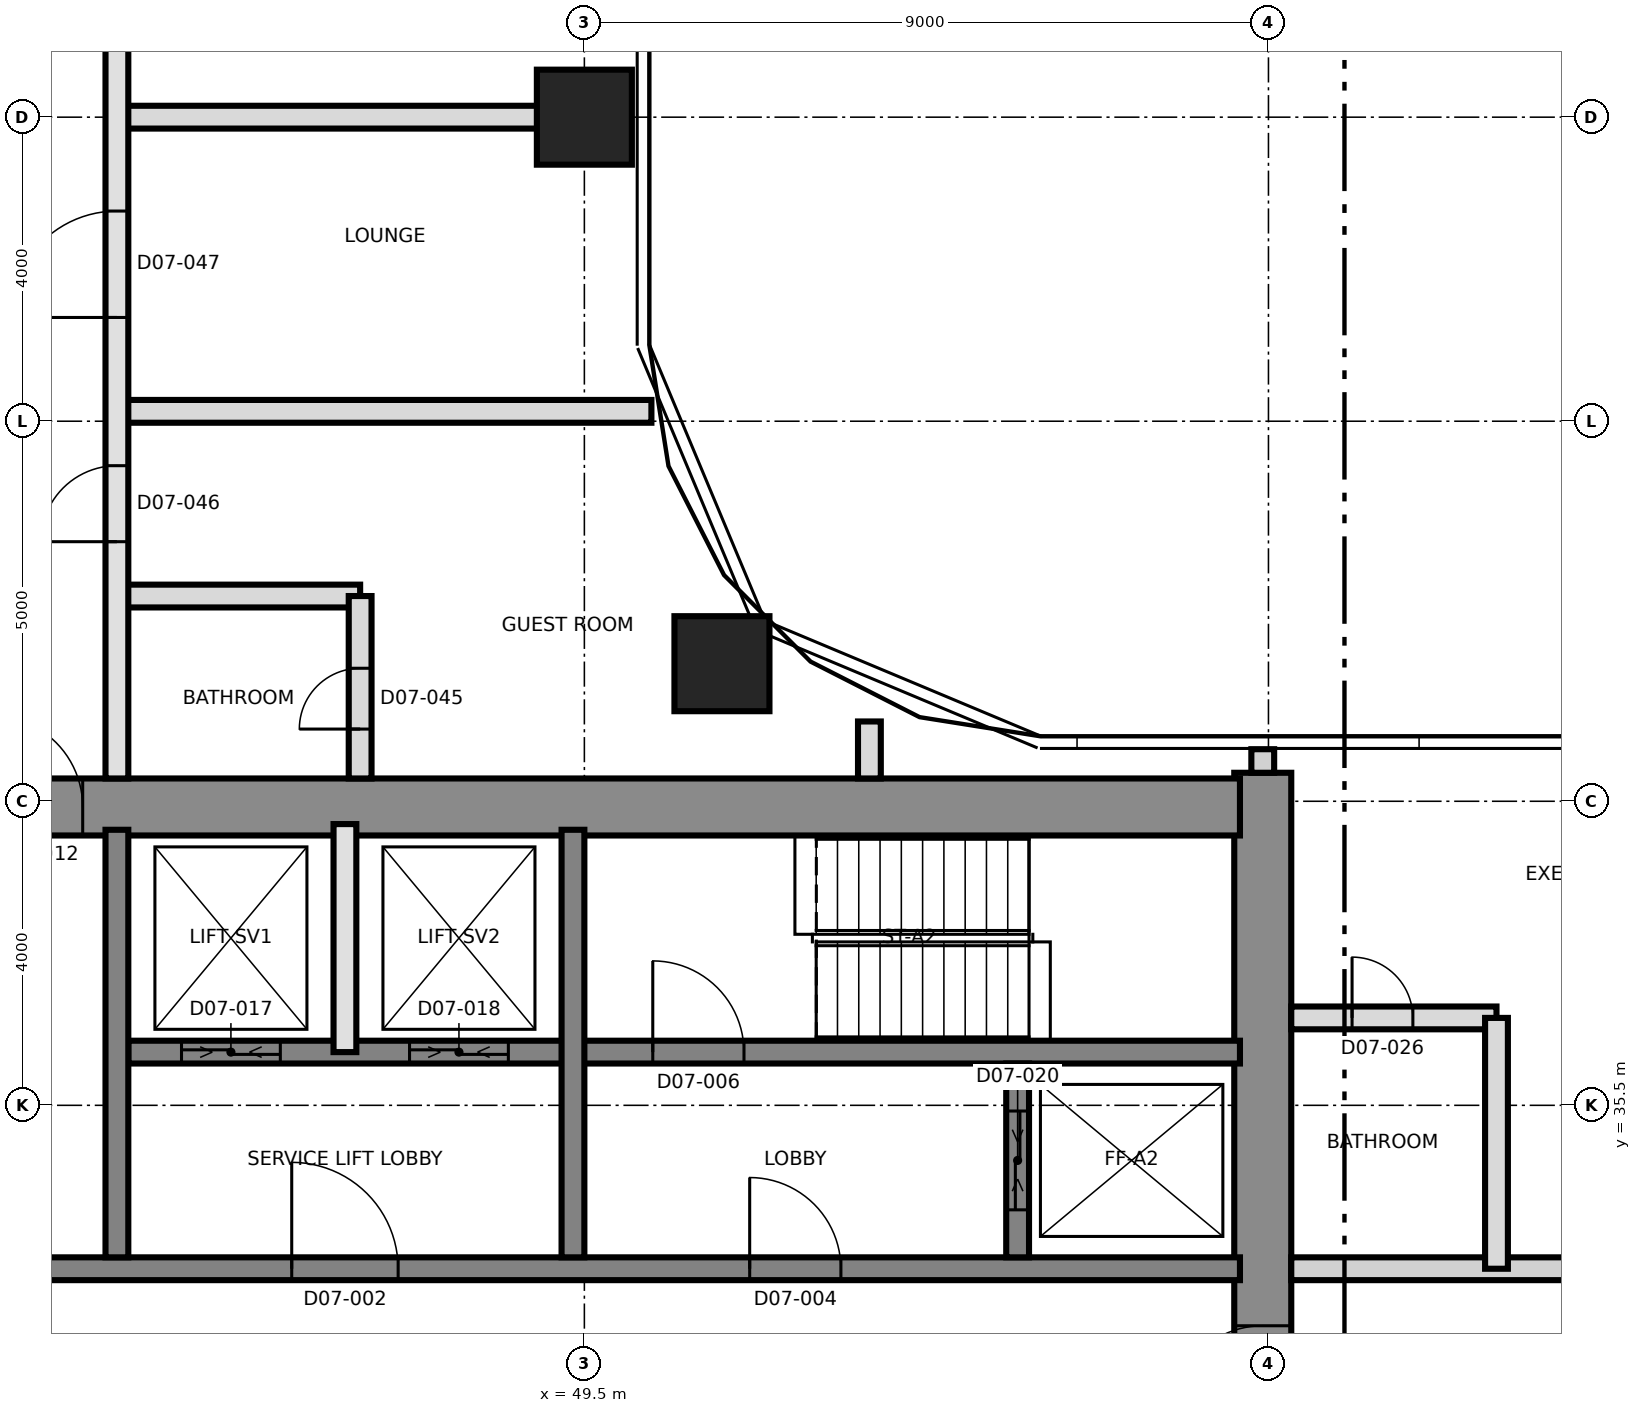
"""IFC4 building model, lengths in metres.
Left out: names, types, materials, properties, quantities, classifications, styles, units other than length and angle.
Written with IfcOpenShell. Run it as: python <this file> out.ifc"""

import sys

from ifc_helpers import new_model, si_unit, direction, frame, frame_2d, origin, origin_2d, place, context, subcontext, project, spatial, rectangle, extrude, element, fill, save


model = new_model("IFC4")
c1 = context("Model", 3, precision=1e-05, world=origin(), true_north=direction((0.0, 1.0)))
c2 = subcontext(c1, "Body", "Model", "MODEL_VIEW")
j1 = project(units=[si_unit("LENGTHUNIT", "METRE"), si_unit("PLANEANGLEUNIT", "RADIAN")], contexts=[c1])
p1 = place(None, origin())
s1 = spatial("IfcSite", under=j1, at=p1, CompositionType="ELEMENT")
p2 = place(p1, origin())
s2 = spatial("IfcBuilding", under=s1, at=p2, CompositionType="ELEMENT")
p3 = place(p2, frame((0.0, 0.0, 94.5)))
s3 = spatial("IfcBuildingStorey", under=s2, at=p3, CompositionType="ELEMENT", Elevation=94.5)
p4 = place(p3, frame((58.425, 21.125, 0.0), z_axis=(0.0, 0.0, 1.0), x_axis=(0.0, 1.0, 0.0)))
e1 = element("IfcWall", 1, at=p4, inside=s3, PredefinedType="SHEAR", context=c2, shape_type="SweptSolid", body=[
    extrude(rectangle(XDim=18.75, YDim=0.75, at=frame_2d((9.375, 0.0))), origin(), (0.0, 0.0, 1.0), 3.7),
])
p5 = place(p4, frame((10.275, 0.0, 0.0)))
e2 = element("IfcOpeningElement", 2, at=p5, cuts=e1, PredefinedType="OPENING", context=c2, shape_type="SweptSolid", body=[
    extrude(rectangle(XDim=1.2, YDim=2.1, at=frame_2d((0.6, 1.05))), frame((0.0, 0.385, 0.0), z_axis=(0.0, -1.0, 0.0), x_axis=(1.0, 0.0, 0.0)), (0.0, 0.0, 1.0), 0.77),
])
p6 = place(p3, frame((31.125, 39.425, 0.0), z_axis=(0.0, 0.0, 1.0), x_axis=(1.0, 0.0, 0.0)))
e3 = element("IfcWall", 3, at=p6, inside=s3, PredefinedType="SHEAR", context=c2, shape_type="SweptSolid", body=[
    extrude(rectangle(XDim=27.0, YDim=0.75, at=frame_2d((13.5, 0.0))), origin(), (0.0, 0.0, 1.0), 3.7),
])
p7 = place(p6, frame((10.575, 0.0, 0.0)))
e4 = element("IfcOpeningElement", 4, at=p7, cuts=e3, PredefinedType="OPENING", context=c2, shape_type="SweptSolid", body=[
    extrude(rectangle(XDim=1.2, YDim=2.1, at=frame_2d((0.6, 1.05))), frame((0.0, 0.385, 0.0), z_axis=(0.0, -1.0, 0.0), x_axis=(1.0, 0.0, 0.0)), (0.0, 0.0, 1.0), 0.77),
])
p8 = place(p3, frame((31.875, 33.35, 0.0), z_axis=(0.0, 0.0, 1.0), x_axis=(1.0, 0.0, 0.0)))
e5 = element("IfcWall", 5, at=p8, inside=s3, PredefinedType="SHEAR", context=c2, shape_type="SweptSolid", body=[
    extrude(rectangle(XDim=26.25, YDim=0.3, at=frame_2d((13.125, 0.0))), origin(), (0.0, 0.0, 1.0), 3.7),
])
p9 = place(p8, frame((13.775, 0.0, 0.0)))
e6 = element("IfcOpeningElement", 6, at=p9, cuts=e5, PredefinedType="OPENING", context=c2, shape_type="SweptSolid", body=[
    extrude(rectangle(XDim=1.4, YDim=2.1, at=frame_2d((0.7, 1.05))), frame((0.0, 0.16, 0.0), z_axis=(0.0, -1.0, 0.0), x_axis=(1.0, 0.0, 0.0)), (0.0, 0.0, 1.0), 0.32),
])
p10 = place(p8, frame((5.25, 0.0, 0.0)))
e7 = element("IfcOpeningElement", 7, at=p10, cuts=e5, PredefinedType="OPENING", context=c2, shape_type="SweptSolid", body=[
    extrude(rectangle(XDim=1.2, YDim=2.1, at=frame_2d((0.6, 1.05))), frame((0.0, 0.16, 0.0), z_axis=(0.0, -1.0, 0.0), x_axis=(1.0, 0.0, 0.0)), (0.0, 0.0, 1.0), 0.32),
])
p11 = place(p8, frame((19.8, 0.0, 0.0)))
e8 = element("IfcOpeningElement", 8, at=p11, cuts=e5, PredefinedType="OPENING", context=c2, shape_type="SweptSolid", body=[
    extrude(rectangle(XDim=1.2, YDim=2.1, at=frame_2d((0.6, 1.05))), frame((0.0, 0.16, 0.0), z_axis=(0.0, -1.0, 0.0), x_axis=(1.0, 0.0, 0.0)), (0.0, 0.0, 1.0), 0.32),
])
p12 = place(p3, frame((43.5, 36.2, 0.0), z_axis=(0.0, 0.0, 1.0), x_axis=(1.0, 0.0, 0.0)))
e9 = element("IfcWall", 9, at=p12, inside=s3, PredefinedType="SHEAR", context=c2, shape_type="SweptSolid", body=[
    extrude(rectangle(XDim=14.625, YDim=0.3, at=frame_2d((7.312, 0.0))), origin(), (0.0, 0.0, 1.0), 3.7),
])
p13 = place(p12, frame((6.9, 0.0, 0.0)))
e10 = element("IfcOpeningElement", 10, at=p13, cuts=e9, PredefinedType="OPENING", context=c2, shape_type="SweptSolid", body=[
    extrude(rectangle(XDim=1.2, YDim=2.1, at=frame_2d((0.6, 1.05))), frame((0.0, 0.16, 0.0), z_axis=(0.0, -1.0, 0.0), x_axis=(1.0, 0.0, 0.0)), (0.0, 0.0, 1.0), 0.32),
])
p14 = place(p12, frame((0.7, 0.0, 0.0)))
e11 = element("IfcOpeningElement", 11, at=p14, cuts=e9, PredefinedType="OPENING", context=c2, shape_type="SweptSolid", body=[
    extrude(rectangle(XDim=1.3, YDim=2.4, at=frame_2d((0.65, 1.2))), frame((0.0, 0.16, 0.0), z_axis=(0.0, -1.0, 0.0), x_axis=(1.0, 0.0, 0.0)), (0.0, 0.0, 1.0), 0.32),
])
p15 = place(p12, frame((3.7, 0.0, 0.0)))
e12 = element("IfcOpeningElement", 12, at=p15, cuts=e9, PredefinedType="OPENING", context=c2, shape_type="SweptSolid", body=[
    extrude(rectangle(XDim=1.3, YDim=2.4, at=frame_2d((0.65, 1.2))), frame((0.0, 0.16, 0.0), z_axis=(0.0, -1.0, 0.0), x_axis=(1.0, 0.0, 0.0)), (0.0, 0.0, 1.0), 0.32),
])
for number, where, z_axis, x_axis in (
    (13, (43.35, 33.5, 0.0), (0.0, 0.0, 1.0), (0.0, 1.0, 0.0)),
    (14, (49.35, 33.5, 0.0), (0.0, 0.0, 1.0), (0.0, 1.0, 0.0)),
):
    element("IfcWall", number, at=place(p3, frame(where, z_axis=z_axis, x_axis=x_axis)), inside=s3, PredefinedType="SHEAR", context=c2, shape_type="SweptSolid", body=[
        extrude(rectangle(XDim=5.625, YDim=0.3, at=frame_2d((2.812, 0.0))), origin(), (0.0, 0.0, 1.0), 3.7),
    ])
p16 = place(p3, frame((55.2, 33.5, 0.0), z_axis=(0.0, 0.0, 1.0), x_axis=(0.0, 1.0, 0.0)))
e15 = element("IfcWall", 15, at=p16, inside=s3, PredefinedType="SHEAR", context=c2, shape_type="SweptSolid", body=[
    extrude(rectangle(XDim=2.55, YDim=0.3, at=frame_2d((1.275, 0.0))), origin(), (0.0, 0.0, 1.0), 3.7),
])
p17 = place(p16, frame((0.625, 0.0, 0.0)))
e16 = element("IfcOpeningElement", 16, at=p17, cuts=e15, PredefinedType="OPENING", context=c2, shape_type="SweptSolid", body=[
    extrude(rectangle(XDim=1.3, YDim=2.4, at=frame_2d((0.65, 1.2))), frame((0.0, 0.16, 0.0), z_axis=(0.0, -1.0, 0.0), x_axis=(1.0, 0.0, 0.0)), (0.0, 0.0, 1.0), 0.32),
])
for number, where, z_axis, x_axis in (
    (17, (51.31, 41.31, 0.0), (0.0, 0.0, 1.0), (1.0, 0.0, 0.0)),
    (18, (49.5, 48.5, 0.0), (0.0, 0.0, 1.0), (1.0, 0.0, 0.0)),
):
    element("IfcColumn", number, at=place(p3, frame(where, z_axis=z_axis, x_axis=x_axis)), inside=s3, PredefinedType="COLUMN", context=c2, shape_type="SweptSolid", body=[
        extrude(rectangle(XDim=1.25, YDim=1.25, at=origin_2d()), origin(), (0.0, 0.0, 1.0), 3.7),
    ])
p18 = place(p3, frame((46.35, 36.2, 0.0), z_axis=(0.0, 0.0, 1.0), x_axis=(0.0, 1.0, 0.0)))
e19 = element("IfcWall", 19, at=p18, inside=s3, PredefinedType="SOLIDWALL", context=c2, shape_type="SweptSolid", body=[
    extrude(rectangle(XDim=3.0, YDim=0.3, at=frame_2d((1.5, 0.0))), origin(), (0.0, 0.0, 1.0), 3.4),
])
p19 = place(p3, frame((58.8, 33.35, 0.0), z_axis=(0.0, 0.0, 1.0), x_axis=(1.0, 0.0, 0.0)))
e20 = element("IfcWall", 20, at=p19, inside=s3, PredefinedType="PARTITIONING", context=c2, shape_type="SweptSolid", body=[
    extrude(rectangle(XDim=26.53, YDim=0.3, at=frame_2d((13.265, 0.0))), origin(), (0.0, 0.0, 1.0), 3.4),
])
p20 = place(p19, frame((3.7, 0.0, 0.0)))
e21 = element("IfcOpeningElement", 21, at=p20, cuts=e20, PredefinedType="OPENING", context=c2, shape_type="SweptSolid", body=[
    extrude(rectangle(XDim=1.0, YDim=2.4, at=frame_2d((0.5, 1.2))), frame((0.0, 0.16, 0.0), z_axis=(0.0, -1.0, 0.0), x_axis=(1.0, 0.0, 0.0)), (0.0, 0.0, 1.0), 0.32),
])
p21 = place(p19, frame((9.85, 0.0, 0.0)))
e22 = element("IfcOpeningElement", 22, at=p21, cuts=e20, PredefinedType="OPENING", context=c2, shape_type="SweptSolid", body=[
    extrude(rectangle(XDim=1.0, YDim=2.1, at=frame_2d((0.5, 1.05))), frame((0.0, 0.16, 0.0), z_axis=(0.0, -1.0, 0.0), x_axis=(1.0, 0.0, 0.0)), (0.0, 0.0, 1.0), 0.32),
])
p22 = place(p19, frame((15.7, 0.0, 0.0)))
e23 = element("IfcOpeningElement", 23, at=p22, cuts=e20, PredefinedType="OPENING", context=c2, shape_type="SweptSolid", body=[
    extrude(rectangle(XDim=1.0, YDim=2.1, at=frame_2d((0.5, 1.05))), frame((0.0, 0.16, 0.0), z_axis=(0.0, -1.0, 0.0), x_axis=(1.0, 0.0, 0.0)), (0.0, 0.0, 1.0), 0.32),
])
p23 = place(p19, frame((21.7, 0.0, 0.0)))
e24 = element("IfcOpeningElement", 24, at=p23, cuts=e20, PredefinedType="OPENING", context=c2, shape_type="SweptSolid", body=[
    extrude(rectangle(XDim=1.0, YDim=2.4, at=frame_2d((0.5, 1.2))), frame((0.0, 0.16, 0.0), z_axis=(0.0, -1.0, 0.0), x_axis=(1.0, 0.0, 0.0)), (0.0, 0.0, 1.0), 0.32),
])
p24 = place(p3, frame((58.8, 36.65, 0.0), z_axis=(0.0, 0.0, 1.0), x_axis=(1.0, 0.0, 0.0)))
e25 = element("IfcWall", 25, at=p24, inside=s3, PredefinedType="PARTITIONING", context=c2, shape_type="SweptSolid", body=[
    extrude(rectangle(XDim=2.7, YDim=0.3, at=frame_2d((1.35, 0.0))), origin(), (0.0, 0.0, 1.0), 3.4),
])
p25 = place(p24, frame((0.8, 0.0, 0.0)))
e26 = element("IfcOpeningElement", 26, at=p25, cuts=e25, PredefinedType="OPENING", context=c2, shape_type="SweptSolid", body=[
    extrude(rectangle(XDim=0.8, YDim=2.1, at=frame_2d((0.4, 1.05))), frame((0.0, 0.16, 0.0), z_axis=(0.0, -1.0, 0.0), x_axis=(1.0, 0.0, 0.0)), (0.0, 0.0, 1.0), 0.32),
])
p26 = place(p3, frame((43.35, 42.2, 0.0), z_axis=(0.0, 0.0, 1.0), x_axis=(1.0, 0.0, 0.0)))
e27 = element("IfcWall", 27, at=p26, inside=s3, PredefinedType="PARTITIONING", context=c2, shape_type="SweptSolid", body=[
    extrude(rectangle(XDim=3.2, YDim=0.3, at=frame_2d((1.6, 0.0))), origin(), (0.0, 0.0, 1.0), 3.4),
])
p27 = place(p3, frame((43.35, 44.63, 0.0), z_axis=(0.0, 0.0, 1.0), x_axis=(1.0, 0.0, 0.0)))
e28 = element("IfcWall", 28, at=p27, inside=s3, PredefinedType="PARTITIONING", context=c2, shape_type="SweptSolid", body=[
    extrude(rectangle(XDim=7.032, YDim=0.3, at=frame_2d((3.516, 0.0))), origin(), (0.0, 0.0, 1.0), 3.35),
])
p28 = place(p3, frame((43.35, 48.5, 0.0), z_axis=(0.0, 0.0, 1.0), x_axis=(1.0, 0.0, 0.0)))
e29 = element("IfcWall", 29, at=p28, inside=s3, PredefinedType="PARTITIONING", context=c2, shape_type="SweptSolid", body=[
    extrude(rectangle(XDim=6.655, YDim=0.3, at=frame_2d((3.327, 0.0))), origin(), (0.0, 0.0, 1.0), 3.35),
])
p29 = place(p3, frame((43.35, 39.8, 0.0), z_axis=(0.0, 0.0, 1.0), x_axis=(0.0, 1.0, 0.0)))
e30 = element("IfcWall", 30, at=p29, inside=s3, PredefinedType="SOLIDWALL", context=c2, shape_type="SweptSolid", body=[
    extrude(rectangle(XDim=26.0, YDim=0.3, at=frame_2d((13.0, 0.0))), origin(), (0.0, 0.0, 1.0), 3.4),
])
p30 = place(p29, frame((3.115, 0.0, 0.0)))
e31 = element("IfcOpeningElement", 31, at=p30, cuts=e30, PredefinedType="OPENING", context=c2, shape_type="SweptSolid", body=[
    extrude(rectangle(XDim=1.0, YDim=2.1, at=frame_2d((0.5, 1.05))), frame((0.0, 0.16, 0.0), z_axis=(0.0, -1.0, 0.0), x_axis=(1.0, 0.0, 0.0)), (0.0, 0.0, 1.0), 0.32),
])
p31 = place(p29, frame((6.065, 0.0, 0.0)))
e32 = element("IfcOpeningElement", 32, at=p31, cuts=e30, PredefinedType="OPENING", context=c2, shape_type="SweptSolid", body=[
    extrude(rectangle(XDim=1.4, YDim=2.1, at=frame_2d((0.7, 1.05))), frame((0.0, 0.16, 0.0), z_axis=(0.0, -1.0, 0.0), x_axis=(1.0, 0.0, 0.0)), (0.0, 0.0, 1.0), 0.32),
])
p32 = place(p29, frame((9.835, 0.0, 0.0)))
e33 = element("IfcOpeningElement", 33, at=p32, cuts=e30, PredefinedType="OPENING", context=c2, shape_type="SweptSolid", body=[
    extrude(rectangle(XDim=1.2, YDim=2.1, at=frame_2d((0.6, 1.05))), frame((0.0, 0.16, 0.0), z_axis=(0.0, -1.0, 0.0), x_axis=(1.0, 0.0, 0.0)), (0.0, 0.0, 1.0), 0.32),
])
p33 = place(p29, frame((13.085, 0.0, 0.0)))
e34 = element("IfcOpeningElement", 34, at=p33, cuts=e30, PredefinedType="OPENING", context=c2, shape_type="SweptSolid", body=[
    extrude(rectangle(XDim=1.0, YDim=2.1, at=frame_2d((0.5, 1.05))), frame((0.0, 0.16, 0.0), z_axis=(0.0, -1.0, 0.0), x_axis=(1.0, 0.0, 0.0)), (0.0, 0.0, 1.0), 0.32),
])
p34 = place(p29, frame((21.25, 0.0, 0.0)))
e35 = element("IfcOpeningElement", 35, at=p34, cuts=e30, PredefinedType="OPENING", context=c2, shape_type="SweptSolid", body=[
    extrude(rectangle(XDim=1.0, YDim=2.4, at=frame_2d((0.5, 1.2))), frame((0.0, 0.16, 0.0), z_axis=(0.0, -1.0, 0.0), x_axis=(1.0, 0.0, 0.0)), (0.0, 0.0, 1.0), 0.32),
])
p35 = place(p3, frame((46.55, 39.8, 0.0), z_axis=(0.0, 0.0, 1.0), x_axis=(0.0, 1.0, 0.0)))
e36 = element("IfcWall", 36, at=p35, inside=s3, PredefinedType="PARTITIONING", context=c2, shape_type="SweptSolid", body=[
    extrude(rectangle(XDim=2.4, YDim=0.3, at=frame_2d((1.2, 0.0))), origin(), (0.0, 0.0, 1.0), 3.4),
])
p36 = place(p35, frame((0.65, 0.0, 0.0)))
e37 = element("IfcOpeningElement", 37, at=p36, cuts=e36, PredefinedType="OPENING", context=c2, shape_type="SweptSolid", body=[
    extrude(rectangle(XDim=0.8, YDim=2.1, at=frame_2d((0.4, 1.05))), frame((0.0, 0.16, 0.0), z_axis=(0.0, -1.0, 0.0), x_axis=(1.0, 0.0, 0.0)), (0.0, 0.0, 1.0), 0.32),
])
p37 = place(p3, frame((53.25, 39.8, 0.0), z_axis=(0.0, 0.0, 1.0), x_axis=(0.0, 1.0, 0.0)))
e38 = element("IfcWall", 38, at=p37, inside=s3, PredefinedType="PARTITIONING", context=c2, shape_type="SweptSolid", body=[
    extrude(rectangle(XDim=0.75, YDim=0.3, at=frame_2d((0.375, 0.0))), origin(), (0.0, 0.0, 1.0), 3.35),
])
p38 = place(p3, frame((61.5, 33.35, 0.0), z_axis=(0.0, 0.0, 1.0), x_axis=(0.0, 1.0, 0.0)))
e39 = element("IfcWall", 39, at=p38, inside=s3, PredefinedType="PARTITIONING", context=c2, shape_type="SweptSolid", body=[
    extrude(rectangle(XDim=3.3, YDim=0.3, at=frame_2d((1.65, 0.0))), origin(), (0.0, 0.0, 1.0), 3.4),
])
p39 = place(p3, frame((58.425, 39.875, 0.0), z_axis=(0.0, 0.0, 1.0), x_axis=(0.0, 1.0, 0.0)))
e40 = element("IfcWall", 40, at=p39, inside=s3, PredefinedType="PARTITIONING", context=c2, shape_type="SweptSolid", body=[
    extrude(rectangle(XDim=0.31, YDim=0.3, at=frame_2d((0.155, 0.0))), origin(), (0.0, 0.0, 1.0), 3.4),
])
p40 = place(p9, origin())
e41 = element("IfcDoor", 41, at=p40, inside=s3, OperationType="SINGLE_SWING_RIGHT", PredefinedType="DOOR", context=c2, shape_type="SweptSolid", body=[
    extrude(rectangle(XDim=1.4, YDim=2.1, at=frame_2d((0.7, 1.05))), frame((0.0, 0.025, 0.0), z_axis=(0.0, -1.0, 0.0), x_axis=(1.0, 0.0, 0.0)), (0.0, 0.0, 1.0), 0.05),
])
fill(e6, e41)
p41 = place(p11, origin())
e42 = element("IfcDoor", 42, at=p41, inside=s3, OperationType="SINGLE_SWING_RIGHT", PredefinedType="DOOR", context=c2, shape_type="SweptSolid", body=[
    extrude(rectangle(XDim=1.2, YDim=2.1, at=frame_2d((0.6, 1.05))), frame((0.0, 0.025, 0.0), z_axis=(0.0, -1.0, 0.0), x_axis=(1.0, 0.0, 0.0)), (0.0, 0.0, 1.0), 0.05),
])
fill(e8, e42)
p42 = place(p13, origin())
e43 = element("IfcDoor", 43, at=p42, inside=s3, OperationType="SINGLE_SWING_LEFT", PredefinedType="DOOR", context=c2, shape_type="SweptSolid", body=[
    extrude(rectangle(XDim=1.2, YDim=2.1, at=frame_2d((0.6, 1.05))), frame((0.0, 0.025, 0.0), z_axis=(0.0, -1.0, 0.0), x_axis=(1.0, 0.0, 0.0)), (0.0, 0.0, 1.0), 0.05),
])
fill(e10, e43)
p43 = place(p5, origin())
e44 = element("IfcDoor", 44, at=p43, inside=s3, OperationType="SINGLE_SWING_LEFT", PredefinedType="DOOR", context=c2, shape_type="SweptSolid", body=[
    extrude(rectangle(XDim=1.2, YDim=2.1, at=frame_2d((0.6, 1.05))), frame((0.0, 0.025, 0.0), z_axis=(0.0, -1.0, 0.0), x_axis=(1.0, 0.0, 0.0)), (0.0, 0.0, 1.0), 0.05),
])
fill(e2, e44)
p44 = place(p7, origin())
e45 = element("IfcDoor", 45, at=p44, inside=s3, OperationType="SINGLE_SWING_RIGHT", PredefinedType="DOOR", context=c2, shape_type="SweptSolid", body=[
    extrude(rectangle(XDim=1.2, YDim=2.1, at=frame_2d((0.6, 1.05))), frame((0.0, 0.025, 0.0), z_axis=(0.0, -1.0, 0.0), x_axis=(1.0, 0.0, 0.0)), (0.0, 0.0, 1.0), 0.05),
])
fill(e4, e45)
p45 = place(p14, origin())
e46 = element("IfcDoor", 46, at=p45, inside=s3, OperationType="SLIDING_TO_LEFT", PredefinedType="DOOR", context=c2, shape_type="SweptSolid", body=[
    extrude(rectangle(XDim=1.3, YDim=2.4, at=frame_2d((0.65, 1.2))), frame((0.0, 0.025, 0.0), z_axis=(0.0, -1.0, 0.0), x_axis=(1.0, 0.0, 0.0)), (0.0, 0.0, 1.0), 0.05),
])
fill(e11, e46)
p46 = place(p15, origin())
e47 = element("IfcDoor", 47, at=p46, inside=s3, OperationType="SLIDING_TO_LEFT", PredefinedType="DOOR", context=c2, shape_type="SweptSolid", body=[
    extrude(rectangle(XDim=1.3, YDim=2.4, at=frame_2d((0.65, 1.2))), frame((0.0, 0.025, 0.0), z_axis=(0.0, -1.0, 0.0), x_axis=(1.0, 0.0, 0.0)), (0.0, 0.0, 1.0), 0.05),
])
fill(e12, e47)
p47 = place(p17, origin())
e48 = element("IfcDoor", 48, at=p47, inside=s3, OperationType="SLIDING_TO_LEFT", PredefinedType="DOOR", context=c2, shape_type="SweptSolid", body=[
    extrude(rectangle(XDim=1.3, YDim=2.4, at=frame_2d((0.65, 1.2))), frame((0.0, 0.025, 0.0), z_axis=(0.0, -1.0, 0.0), x_axis=(1.0, 0.0, 0.0)), (0.0, 0.0, 1.0), 0.05),
])
fill(e16, e48)
p48 = place(p25, origin())
e49 = element("IfcDoor", 49, at=p48, inside=s3, OperationType="SINGLE_SWING_LEFT", PredefinedType="DOOR", context=c2, shape_type="SweptSolid", body=[
    extrude(rectangle(XDim=0.8, YDim=2.1, at=frame_2d((0.4, 1.05))), frame((0.0, 0.025, 0.0), z_axis=(0.0, -1.0, 0.0), x_axis=(1.0, 0.0, 0.0)), (0.0, 0.0, 1.0), 0.05),
])
fill(e26, e49)
p49 = place(p36, origin())
e50 = element("IfcDoor", 50, at=p49, inside=s3, OperationType="SINGLE_SWING_RIGHT", PredefinedType="DOOR", context=c2, shape_type="SweptSolid", body=[
    extrude(rectangle(XDim=0.8, YDim=2.1, at=frame_2d((0.4, 1.05))), frame((0.0, 0.025, 0.0), z_axis=(0.0, -1.0, 0.0), x_axis=(1.0, 0.0, 0.0)), (0.0, 0.0, 1.0), 0.05),
])
fill(e37, e50)
p50 = place(p30, origin())
e51 = element("IfcDoor", 51, at=p50, inside=s3, OperationType="SINGLE_SWING_LEFT", PredefinedType="DOOR", context=c2, shape_type="SweptSolid", body=[
    extrude(rectangle(XDim=1.0, YDim=2.1, at=frame_2d((0.5, 1.05))), frame((0.0, 0.025, 0.0), z_axis=(0.0, -1.0, 0.0), x_axis=(1.0, 0.0, 0.0)), (0.0, 0.0, 1.0), 0.05),
])
fill(e31, e51)
p51 = place(p31, origin())
e52 = element("IfcDoor", 52, at=p51, inside=s3, OperationType="SINGLE_SWING_LEFT", PredefinedType="DOOR", context=c2, shape_type="SweptSolid", body=[
    extrude(rectangle(XDim=1.4, YDim=2.1, at=frame_2d((0.7, 1.05))), frame((0.0, 0.025, 0.0), z_axis=(0.0, -1.0, 0.0), x_axis=(1.0, 0.0, 0.0)), (0.0, 0.0, 1.0), 0.05),
])
fill(e32, e52)
save(model, sys.argv[1])
